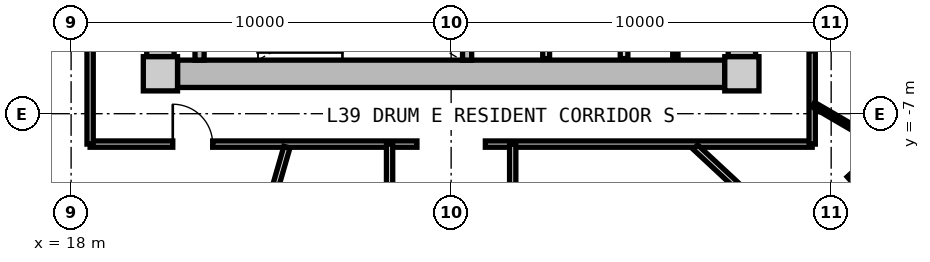
"""IFC4 building model, lengths in metres.
Left out: names, types, materials, properties, quantities, classifications, styles, units other than length and angle.
Written with IfcOpenShell. Run it as: python <this file> out.ifc"""

import sys

from ifc_helpers import new_model, si_unit, direction, frame, frame_2d, origin, origin_2d, place, context, subcontext, project, spatial, rectangle, extrude, source, transform, mapped, element, fill, save


model = new_model("IFC4")
c1 = context("Model", 3, precision=1e-05, world=origin(), true_north=direction((0.0, 1.0)))
c2 = subcontext(c1, "Body", "Model", "MODEL_VIEW")
j1 = project(units=[si_unit("LENGTHUNIT", "METRE"), si_unit("PLANEANGLEUNIT", "RADIAN")], contexts=[c1])
p1 = place(None, origin())
s1 = spatial("IfcSite", under=j1, at=p1, CompositionType="ELEMENT")
p2 = place(p1, origin())
s2 = spatial("IfcBuilding", under=s1, at=p2, CompositionType="ELEMENT")
p3 = place(p2, frame((0.0, 0.0, 126.75)))
s3 = spatial("IfcBuildingStorey", under=s2, at=p3, CompositionType="ELEMENT", Elevation=126.75)
m1 = source(origin(), c2, "Body", "SweptSolid", [
    extrude(rectangle(XDim=0.9, YDim=0.9, at=origin_2d()), origin(), (0.0, 0.0, 1.0), 3.05),
])
for number, where, z_axis, x_axis in (
    (1, (20.35, -5.95, 0.0), (0.0, 0.0, 1.0), (1.0, 0.0, 0.0)),
    (2, (35.65, -5.95, 0.0), (0.0, 0.0, 1.0), (1.0, 0.0, 0.0)),
):
    element("IfcColumn", number, at=place(p3, frame(where, z_axis=z_axis, x_axis=x_axis)), inside=s3, PredefinedType="COLUMN", context=c2, shape_type="MappedRepresentation", body=[
        mapped(m1, transform((0.0, 0.0, 0.0), x_axis=(1.0, 0.0, 0.0), y_axis=(0.0, 1.0, 0.0), z_axis=(0.0, 0.0, 1.0), scale=1.0)),
    ])
m2 = source(origin(), c2, "Body", "SweptSolid", [
    extrude(rectangle(XDim=14.4, YDim=0.72, at=frame_2d((7.2, 0.0))), origin(), (0.0, 0.0, 1.0), 2.73),
])
p4 = place(p3, frame((35.2, -5.95, 0.0), z_axis=(0.0, 0.0, 1.0), x_axis=(-1.0, 0.0, 0.0)))
e3 = element("IfcWall", 3, at=p4, inside=s3, PredefinedType="SHEAR", context=c2, shape_type="MappedRepresentation", body=[
    mapped(m2, transform((0.0, 0.0, 0.0), x_axis=(1.0, 0.0, 0.0), y_axis=(0.0, 1.0, 0.0), z_axis=(0.0, 0.0, 1.0), scale=1.0)),
])
m3 = source(origin(), c2, "Body", "SweptSolid", [
    extrude(rectangle(XDim=11.0, YDim=0.72, at=frame_2d((5.5, 0.0))), origin(), (0.0, 0.0, 1.0), 2.73),
])
p5 = place(p3, frame((20.35, -5.5, 0.0), z_axis=(0.0, 0.0, 1.0), x_axis=(0.0, 1.0, 0.0)))
e4 = element("IfcWall", 4, at=p5, inside=s3, PredefinedType="SHEAR", context=c2, shape_type="MappedRepresentation", body=[
    mapped(m3, transform((0.0, 0.0, 0.0), x_axis=(1.0, 0.0, 0.0), y_axis=(0.0, 1.0, 0.0), z_axis=(0.0, 0.0, 1.0), scale=1.0)),
])
p6 = place(p5, frame((3.8, 0.0, 0.0)))
e5 = element("IfcOpeningElement", 5, at=p6, cuts=e4, PredefinedType="OPENING", context=c2, shape_type="SweptSolid", body=[
    extrude(rectangle(XDim=1.2, YDim=2.15, at=frame_2d((0.6, 1.075))), frame((0.0, 0.37, 0.0), z_axis=(0.0, -1.0, 0.0), x_axis=(1.0, 0.0, 0.0)), (0.0, 0.0, 1.0), 0.74),
])
p7 = place(p3, frame((35.65, 5.5, 0.0), z_axis=(0.0, 0.0, 1.0), x_axis=(0.0, -1.0, 0.0)))
e6 = element("IfcWall", 6, at=p7, inside=s3, PredefinedType="SHEAR", context=c2, shape_type="MappedRepresentation", body=[
    mapped(m3, transform((0.0, 0.0, 0.0), x_axis=(1.0, 0.0, 0.0), y_axis=(0.0, 1.0, 0.0), z_axis=(0.0, 0.0, 1.0), scale=1.0)),
])
p8 = place(p7, frame((5.65, 0.0, 0.0)))
e7 = element("IfcOpeningElement", 7, at=p8, cuts=e6, PredefinedType="OPENING", context=c2, shape_type="SweptSolid", body=[
    extrude(rectangle(XDim=1.2, YDim=2.15, at=frame_2d((0.6, 1.075))), frame((0.0, 0.37, 0.0), z_axis=(0.0, -1.0, 0.0), x_axis=(1.0, 0.0, 0.0)), (0.0, 0.0, 1.0), 0.74),
])
m4 = source(origin(), c2, "Body", "SweptSolid", [
    extrude(rectangle(XDim=3.14, YDim=0.24, at=frame_2d((1.57, 0.0))), origin(), (0.0, 0.0, 1.0), 2.73),
])
for number, where, z_axis, x_axis in (
    (8, (21.38, -5.59, 0.0), (0.0, 0.0, 1.0), (0.0, 1.0, 0.0)),
    (9, (28.42, -5.59, 0.0), (0.0, 0.0, 1.0), (0.0, 1.0, 0.0)),
):
    element("IfcWall", number, at=place(p3, frame(where, z_axis=z_axis, x_axis=x_axis)), inside=s3, PredefinedType="PARTITIONING", context=c2, shape_type="MappedRepresentation", body=[
        mapped(m4, transform((0.0, 0.0, 0.0), x_axis=(1.0, 0.0, 0.0), y_axis=(0.0, 1.0, 0.0), z_axis=(0.0, 0.0, 1.0), scale=1.0)),
    ])
m5 = source(origin(), c2, "Body", "SweptSolid", [
    extrude(rectangle(XDim=3.8, YDim=0.2, at=frame_2d((1.9, 0.0))), origin(), (0.0, 0.0, 1.0), 2.715),
])
p9 = place(p3, frame((32.55, -5.55, 0.0), z_axis=(0.0, 0.0, 1.0), x_axis=(0.0, 1.0, 0.0)))
e10 = element("IfcWall", 10, at=p9, inside=s3, PredefinedType="PARTITIONING", context=c2, shape_type="MappedRepresentation", body=[
    mapped(m5, transform((0.0, 0.0, 0.0), x_axis=(1.0, 0.0, 0.0), y_axis=(0.0, 1.0, 0.0), z_axis=(0.0, 0.0, 1.0), scale=1.0)),
])
m6 = source(origin(), c2, "Body", "SweptSolid", [
    extrude(rectangle(XDim=3.22, YDim=0.18, at=frame_2d((1.61, 0.0))), origin(), (0.0, 0.0, 1.0), 2.715),
])
p10 = place(p3, frame((30.5, -5.55, 0.0), z_axis=(0.0, 0.0, 1.0), x_axis=(0.0, 1.0, 0.0)))
e11 = element("IfcWall", 11, at=p10, inside=s3, PredefinedType="PARTITIONING", context=c2, shape_type="MappedRepresentation", body=[
    mapped(m6, transform((0.0, 0.0, 0.0), x_axis=(1.0, 0.0, 0.0), y_axis=(0.0, 1.0, 0.0), z_axis=(0.0, 0.0, 1.0), scale=1.0)),
])
m7 = source(origin(), c2, "Body", "SweptSolid", [
    extrude(rectangle(XDim=3.8, YDim=0.14, at=frame_2d((1.9, 0.0))), origin(), (0.0, 0.0, 1.0), 2.715),
])
p11 = place(p3, frame((33.9, -5.55, 0.0), z_axis=(0.0, 0.0, 1.0), x_axis=(0.0, 1.0, 0.0)))
e12 = element("IfcWall", 12, at=p11, inside=s3, PredefinedType="PARTITIONING", context=c2, shape_type="MappedRepresentation", body=[
    mapped(m7, transform((0.0, 0.0, 0.0), x_axis=(1.0, 0.0, 0.0), y_axis=(0.0, 1.0, 0.0), z_axis=(0.0, 0.0, 1.0), scale=1.0)),
])
m8 = source(origin(), c2, "Body", "SweptSolid", [
    extrude(rectangle(XDim=8.6, YDim=0.165, at=frame_2d((4.3, 0.0))), origin(), (0.0, 0.0, 1.0), 2.715),
])
p12 = place(p3, frame((37.5, -7.8, 0.0), z_axis=(0.0, 0.0, 1.0), x_axis=(-1.0, 0.0, 0.0)))
e13 = element("IfcWall", 13, at=p12, inside=s3, PredefinedType="PARTITIONING", context=c2, shape_type="MappedRepresentation", body=[
    mapped(m8, transform((0.0, 0.0, 0.0), x_axis=(1.0, 0.0, 0.0), y_axis=(0.0, 1.0, 0.0), z_axis=(0.0, 0.0, 1.0), scale=1.0)),
])
p13 = place(p3, frame((27.1, -7.8, 0.0), z_axis=(0.0, 0.0, 1.0), x_axis=(-1.0, 0.0, 0.0)))
e14 = element("IfcWall", 14, at=p13, inside=s3, PredefinedType="PARTITIONING", context=c2, shape_type="MappedRepresentation", body=[
    mapped(m8, transform((0.0, 0.0, 0.0), x_axis=(1.0, 0.0, 0.0), y_axis=(0.0, 1.0, 0.0), z_axis=(0.0, 0.0, 1.0), scale=1.0)),
])
p14 = place(p13, frame((5.375, 0.0, 0.0)))
e15 = element("IfcOpeningElement", 15, at=p14, cuts=e14, PredefinedType="OPENING", context=c2, shape_type="SweptSolid", body=[
    extrude(rectangle(XDim=1.05, YDim=2.15, at=frame_2d((0.525, 1.075))), frame((0.0, 0.093, 0.0), z_axis=(0.0, -1.0, 0.0), x_axis=(1.0, 0.0, 0.0)), (0.0, 0.0, 1.0), 0.185),
])
m9 = source(origin(), c2, "Body", "SweptSolid", [
    extrude(rectangle(XDim=15.6, YDim=0.165, at=frame_2d((7.8, 0.0))), origin(), (0.0, 0.0, 1.0), 2.715),
])
p15 = place(p3, frame((18.5, -7.8, 0.0), z_axis=(0.0, 0.0, 1.0), x_axis=(0.0, 1.0, 0.0)))
e16 = element("IfcWall", 16, at=p15, inside=s3, PredefinedType="PARTITIONING", context=c2, shape_type="MappedRepresentation", body=[
    mapped(m9, transform((0.0, 0.0, 0.0), x_axis=(1.0, 0.0, 0.0), y_axis=(0.0, 1.0, 0.0), z_axis=(0.0, 0.0, 1.0), scale=1.0)),
])
p16 = place(p15, frame((10.383, 0.0, 0.0)))
e17 = element("IfcOpeningElement", 17, at=p16, cuts=e16, PredefinedType="OPENING", context=c2, shape_type="SweptSolid", body=[
    extrude(rectangle(XDim=1.05, YDim=2.15, at=frame_2d((0.525, 1.075))), frame((0.0, 0.093, 0.0), z_axis=(0.0, -1.0, 0.0), x_axis=(1.0, 0.0, 0.0)), (0.0, 0.0, 1.0), 0.185),
])
p17 = place(p15, frame((6.419, 0.0, 0.0)))
e18 = element("IfcOpeningElement", 18, at=p17, cuts=e16, PredefinedType="OPENING", context=c2, shape_type="SweptSolid", body=[
    extrude(rectangle(XDim=1.05, YDim=2.15, at=frame_2d((0.525, 1.075))), frame((0.0, 0.093, 0.0), z_axis=(0.0, -1.0, 0.0), x_axis=(1.0, 0.0, 0.0)), (0.0, 0.0, 1.0), 0.185),
])
p18 = place(p3, frame((37.5, 7.8, 0.0), z_axis=(0.0, 0.0, 1.0), x_axis=(0.0, -1.0, 0.0)))
e19 = element("IfcWall", 19, at=p18, inside=s3, PredefinedType="PARTITIONING", context=c2, shape_type="MappedRepresentation", body=[
    mapped(m9, transform((0.0, 0.0, 0.0), x_axis=(1.0, 0.0, 0.0), y_axis=(0.0, 1.0, 0.0), z_axis=(0.0, 0.0, 1.0), scale=1.0)),
])
p19 = place(p18, frame((12.094, 0.0, 0.0)))
e20 = element("IfcOpeningElement", 20, at=p19, cuts=e19, PredefinedType="OPENING", context=c2, shape_type="SweptSolid", body=[
    extrude(rectangle(XDim=1.05, YDim=2.15, at=frame_2d((0.525, 1.075))), frame((0.0, 0.093, 0.0), z_axis=(0.0, -1.0, 0.0), x_axis=(1.0, 0.0, 0.0)), (0.0, 0.0, 1.0), 0.185),
])
p20 = place(p18, frame((5.971, 0.0, 0.0)))
e21 = element("IfcOpeningElement", 21, at=p20, cuts=e19, PredefinedType="OPENING", context=c2, shape_type="SweptSolid", body=[
    extrude(rectangle(XDim=1.05, YDim=2.15, at=frame_2d((0.525, 1.075))), frame((0.0, 0.093, 0.0), z_axis=(0.0, -1.0, 0.0), x_axis=(1.0, 0.0, 0.0)), (0.0, 0.0, 1.0), 0.185),
])
p21 = place(p18, frame((3.324, 0.0, 0.0)))
e22 = element("IfcOpeningElement", 22, at=p21, cuts=e19, PredefinedType="OPENING", context=c2, shape_type="SweptSolid", body=[
    extrude(rectangle(XDim=0.92, YDim=2.1, at=frame_2d((0.46, 1.05))), frame((0.0, 0.093, 0.0), z_axis=(0.0, -1.0, 0.0), x_axis=(1.0, 0.0, 0.0)), (0.0, 0.0, 1.0), 0.185),
])
m10 = source(origin(), c2, "Body", "SweptSolid", [
    extrude(rectangle(XDim=8.989, YDim=0.165, at=frame_2d((4.495, 0.0))), origin(), (0.0, 0.0, 1.0), 2.215),
])
p22 = place(p3, frame((23.678, -7.88, 0.0), z_axis=(0.0, 0.0, 1.0), x_axis=(-0.27702323008, -0.960863221274, 0.0)))
e23 = element("IfcWall", 23, at=p22, inside=s3, PredefinedType="PARTITIONING", context=c2, shape_type="MappedRepresentation", body=[
    mapped(m10, transform((0.0, 0.0, 0.0), x_axis=(1.0, 0.0, 0.0), y_axis=(0.0, 1.0, 0.0), z_axis=(0.0, 0.0, 1.0), scale=1.0)),
])
m11 = source(origin(), c2, "Body", "SweptSolid", [
    extrude(rectangle(XDim=6.187, YDim=0.165, at=frame_2d((3.093, 0.0))), origin(), (0.0, 0.0, 1.0), 2.215),
])
p23 = place(p3, frame((34.429, -7.88, 0.0), z_axis=(0.0, 0.0, 1.0), x_axis=(0.732501077882, -0.680765870841, 0.0)))
e24 = element("IfcWall", 24, at=p23, inside=s3, PredefinedType="PARTITIONING", context=c2, shape_type="MappedRepresentation", body=[
    mapped(m11, transform((0.0, 0.0, 0.0), x_axis=(1.0, 0.0, 0.0), y_axis=(0.0, 1.0, 0.0), z_axis=(0.0, 0.0, 1.0), scale=1.0)),
])
m12 = source(origin(), c2, "Body", "SweptSolid", [
    extrude(rectangle(XDim=6.99, YDim=0.165, at=frame_2d((3.495, 0.0))), origin(), (0.0, 0.0, 1.0), 2.715),
])
p24 = place(p3, frame((26.38, -14.79, 0.0), z_axis=(0.0, 0.0, 1.0), x_axis=(0.0, 1.0, 0.0)))
e25 = element("IfcWall", 25, at=p24, inside=s3, PredefinedType="PARTITIONING", context=c2, shape_type="MappedRepresentation", body=[
    mapped(m12, transform((0.0, 0.0, 0.0), x_axis=(1.0, 0.0, 0.0), y_axis=(0.0, 1.0, 0.0), z_axis=(0.0, 0.0, 1.0), scale=1.0)),
])
p25 = place(p24, frame((2.97, 0.0, 0.0)))
e26 = element("IfcOpeningElement", 26, at=p25, cuts=e25, PredefinedType="OPENING", context=c2, shape_type="SweptSolid", body=[
    extrude(rectangle(XDim=1.05, YDim=2.15, at=frame_2d((0.525, 1.075))), frame((0.0, 0.093, 0.0), z_axis=(0.0, -1.0, 0.0), x_axis=(1.0, 0.0, 0.0)), (0.0, 0.0, 1.0), 0.185),
])
m13 = source(origin(), c2, "Body", "SweptSolid", [
    extrude(rectangle(XDim=6.99, YDim=0.165, at=frame_2d((3.495, 0.0))), origin(), (0.0, 0.0, 1.0), 2.215),
])
p26 = place(p3, frame((29.62, -14.79, 0.0), z_axis=(0.0, 0.0, 1.0), x_axis=(0.0, 1.0, 0.0)))
e27 = element("IfcWall", 27, at=p26, inside=s3, PredefinedType="PARTITIONING", context=c2, shape_type="MappedRepresentation", body=[
    mapped(m13, transform((0.0, 0.0, 0.0), x_axis=(1.0, 0.0, 0.0), y_axis=(0.0, 1.0, 0.0), z_axis=(0.0, 0.0, 1.0), scale=1.0)),
])
p27 = place(p26, frame((2.97, 0.0, 0.0)))
e28 = element("IfcOpeningElement", 28, at=p27, cuts=e27, PredefinedType="OPENING", context=c2, shape_type="SweptSolid", body=[
    extrude(rectangle(XDim=1.05, YDim=2.15, at=frame_2d((0.525, 1.075))), frame((0.0, 0.093, 0.0), z_axis=(0.0, -1.0, 0.0), x_axis=(1.0, 0.0, 0.0)), (0.0, 0.0, 1.0), 0.185),
])
m14 = source(origin(), c2, "Body", "SweptSolid", [
    extrude(rectangle(XDim=2.172, YDim=0.14, at=frame_2d((1.086, 0.0))), origin(), (0.0, 0.0, 1.0), 2.715),
])
p28 = place(p3, frame((37.53, -6.762, 0.0), z_axis=(0.0, 0.0, 1.0), x_axis=(0.863562702562, -0.504241468688, 0.0)))
e29 = element("IfcWall", 29, at=p28, inside=s3, PredefinedType="PARTITIONING", context=c2, shape_type="MappedRepresentation", body=[
    mapped(m14, transform((0.0, 0.0, 0.0), x_axis=(1.0, 0.0, 0.0), y_axis=(0.0, 1.0, 0.0), z_axis=(0.0, 0.0, 1.0), scale=1.0)),
])
m15 = source(origin(), c2, "Body", "SweptSolid", [
    extrude(rectangle(XDim=3.457, YDim=0.14, at=frame_2d((1.729, 0.0))), origin(), (0.0, 0.0, 1.0), 2.715),
])
p29 = place(p3, frame((39.405, -7.857, 0.0), z_axis=(0.0, 0.0, 1.0), x_axis=(-0.737567375492, -0.675273549467, 0.0)))
e30 = element("IfcWall", 30, at=p29, inside=s3, PredefinedType="PARTITIONING", context=c2, shape_type="MappedRepresentation", body=[
    mapped(m15, transform((0.0, 0.0, 0.0), x_axis=(1.0, 0.0, 0.0), y_axis=(0.0, 1.0, 0.0), z_axis=(0.0, 0.0, 1.0), scale=1.0)),
])
p30 = place(p29, frame((1.268, 0.0, 0.0)))
e31 = element("IfcOpeningElement", 31, at=p30, cuts=e30, PredefinedType="OPENING", context=c2, shape_type="SweptSolid", body=[
    extrude(rectangle(XDim=0.92, YDim=2.1, at=frame_2d((0.46, 1.05))), frame((0.0, 0.08, 0.0), z_axis=(0.0, -1.0, 0.0), x_axis=(1.0, 0.0, 0.0)), (0.0, 0.0, 1.0), 0.16),
])
m16 = source(origin(), c2, "Body", "SweptSolid", [
    extrude(rectangle(XDim=1.05, YDim=2.15, at=frame_2d((0.525, 1.075))), frame((0.0, 0.025, 0.0), z_axis=(0.0, -1.0, 0.0), x_axis=(1.0, 0.0, 0.0)), (0.0, 0.0, 1.0), 0.05),
])
p31 = place(p14, frame((1.05, 0.0, 0.0), z_axis=(0.0, 0.0, 1.0), x_axis=(-1.0, 0.0, 0.0)))
e32 = element("IfcDoor", 32, at=p31, inside=s3, OperationType="SINGLE_SWING_LEFT", PredefinedType="DOOR", context=c2, shape_type="MappedRepresentation", body=[
    mapped(m16, transform((0.0, 0.0, 0.0), x_axis=(1.0, 0.0, 0.0), y_axis=(0.0, 1.0, 0.0), z_axis=(0.0, 0.0, 1.0), scale=1.0)),
])
fill(e15, e32)
m17 = source(origin(), c2, "Body", "SweptSolid", [
    extrude(rectangle(XDim=0.92, YDim=2.1, at=frame_2d((0.46, 1.05))), frame((0.0, 0.025, 0.0), z_axis=(0.0, -1.0, 0.0), x_axis=(1.0, 0.0, 0.0)), (0.0, 0.0, 1.0), 0.05),
])
p32 = place(p30, origin())
e33 = element("IfcDoor", 33, at=p32, inside=s3, OperationType="SINGLE_SWING_LEFT", PredefinedType="DOOR", context=c2, shape_type="MappedRepresentation", body=[
    mapped(m17, transform((0.0, 0.0, 0.0), x_axis=(1.0, 0.0, 0.0), y_axis=(0.0, 1.0, 0.0), z_axis=(0.0, 0.0, 1.0), scale=1.0)),
])
fill(e31, e33)
save(model, sys.argv[1])
